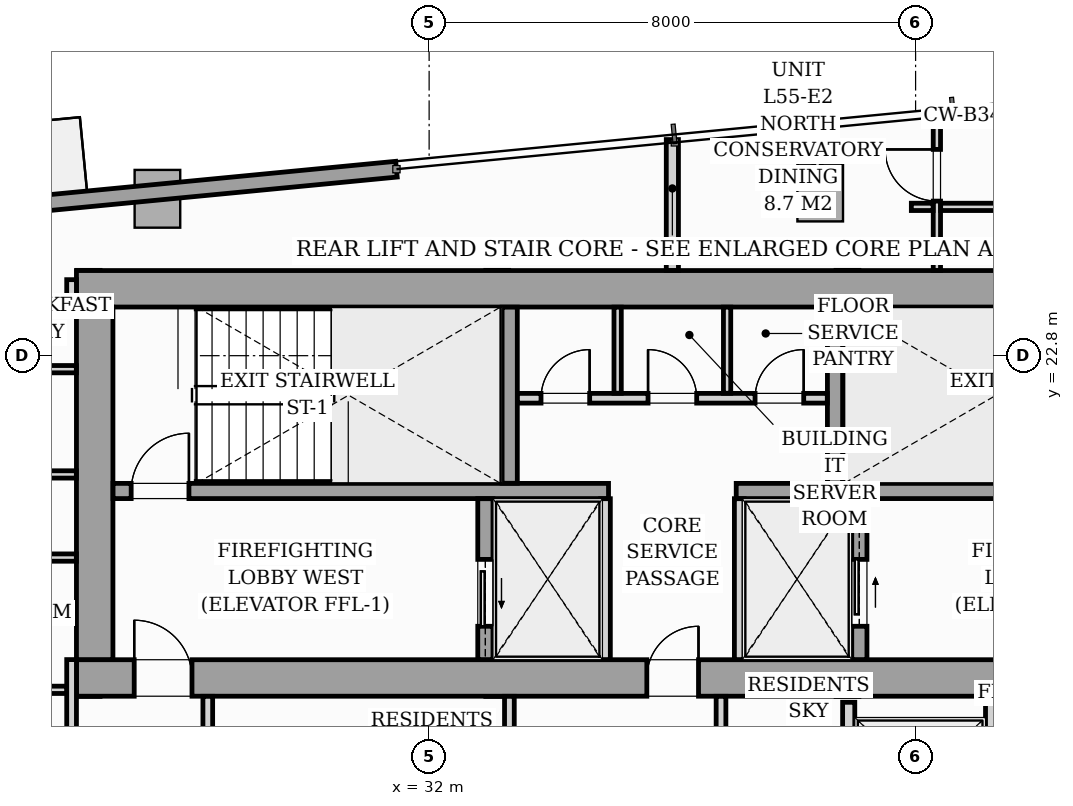
"""IFC4 building model, lengths in metres.
Left out: names, types, materials, properties, quantities, classifications, styles, units other than length and angle.
Written with IfcOpenShell. Run it as: python <this file> out.ifc"""

import sys

from ifc_helpers import new_model, si_unit, direction, frame, frame_2d, origin, origin_2d, place, context, subcontext, project, spatial, rectangle, i_section, extrude, source, transform, mapped, element, fill, save


model = new_model("IFC4")
c1 = context("Model", 3, precision=1e-05, world=origin(), true_north=direction((0.0, 1.0)))
c2 = subcontext(c1, "Body", "Model", "MODEL_VIEW")
j1 = project(units=[si_unit("LENGTHUNIT", "METRE"), si_unit("PLANEANGLEUNIT", "RADIAN")], contexts=[c1])
p1 = place(None, origin())
s1 = spatial("IfcSite", under=j1, at=p1, CompositionType="ELEMENT")
p2 = place(p1, origin())
s2 = spatial("IfcBuilding", under=s1, at=p2, CompositionType="ELEMENT")
p3 = place(p2, frame((0.0, 0.0, 192.2)))
s3 = spatial("IfcBuildingStorey", under=s2, at=p3, CompositionType="ELEMENT", Elevation=192.2)
m1 = source(origin(), c2, "Body", "SweptSolid", [
    extrude(i_section(OverallWidth=0.416, OverallDepth=0.446, WebThickness=0.039, FlangeThickness=0.063, FilletRadius=0.018, at=origin_2d()), origin(), (0.0, 0.0, 1.0), 3.196),
])
for number, where, z_axis, x_axis in (
    (1, (26.4, 17.4, 0.002), (0.0, 0.0, 1.0), (1.0, 0.0, 0.0)),
    (2, (33.12, 17.4, 0.002), (0.0, 0.0, 1.0), (1.0, 0.0, 0.0)),
    (3, (38.88, 17.4, 0.002), (0.0, 0.0, 1.0), (1.0, 0.0, 0.0)),
    (4, (26.4, 24.0, 0.002), (0.0, 0.0, 1.0), (1.0, 0.0, 0.0)),
    (5, (33.12, 24.0, 0.002), (0.0, 0.0, 1.0), (1.0, 0.0, 0.0)),
    (6, (38.88, 24.0, 0.002), (0.0, 0.0, 1.0), (1.0, 0.0, 0.0)),
):
    element("IfcColumn", number, at=place(p3, frame(where, z_axis=z_axis, x_axis=x_axis)), inside=s3, PredefinedType="PILASTER", context=c2, shape_type="MappedRepresentation", body=[
        mapped(m1, transform((0.0, 0.0, 0.0), scale=1.0)),
    ])
m2 = source(origin(), c2, "Body", "SweptSolid", [
    extrude(rectangle(XDim=0.75, YDim=0.95, at=origin_2d()), origin(), (0.0, 0.0, 1.0), 3.196),
])
for number, where, z_axis, x_axis in (
    (7, (27.532, 25.38, 0.002), (0.0, 0.0, 1.0), (0.995, 0.096, 0.0)),
    (8, (38.431, 25.483, 0.002), (0.0, 0.0, 1.0), (0.995, 0.096, 0.0)),
):
    element("IfcColumn", number, at=place(p3, frame(where, z_axis=z_axis, x_axis=x_axis)), inside=s3, PredefinedType="COLUMN", context=c2, shape_type="MappedRepresentation", body=[
        mapped(m2, transform((0.0, 0.0, 0.0), scale=1.0)),
    ])
p4 = place(p3, frame((15.437, 24.324, 0.0), z_axis=(0.0, 0.0, 1.0), x_axis=(0.995395627913, 0.095851676732, 0.0)))
e9 = element("IfcWall", 9, at=p4, inside=s3, PredefinedType="STANDARD", context=c2, shape_type="SweptSolid", body=[
    extrude(rectangle(XDim=16.1, YDim=0.26, at=frame_2d((8.05, 0.0))), origin(), (0.0, 0.0, 1.0), 2.94),
])
p5 = place(p4, frame((5.721, 0.0, 0.0)))
e10 = element("IfcOpeningElement", 10, at=p5, cuts=e9, PredefinedType="OPENING", context=c2, shape_type="SweptSolid", body=[
    extrude(rectangle(XDim=1.8, YDim=2.06, at=frame_2d((0.9, 1.03))), frame((0.0, 0.14, 0.0), z_axis=(0.0, -1.0, 0.0), x_axis=(1.0, 0.0, 0.0)), (0.0, 0.0, 1.0), 0.28),
])
p6 = place(p4, frame((2.05, 0.0, 0.65)))
e11 = element("IfcOpeningElement", 11, at=p6, cuts=e9, PredefinedType="OPENING", context=c2, shape_type="SweptSolid", body=[
    extrude(rectangle(XDim=1.6, YDim=1.5, at=frame_2d((0.8, 0.75))), frame((0.0, 0.14, 0.0), z_axis=(0.0, -1.0, 0.0), x_axis=(1.0, 0.0, 0.0)), (0.0, 0.0, 1.0), 0.28),
])
p7 = place(p3, frame((26.2, 17.5, 0.0), z_axis=(0.0, 0.0, 1.0), x_axis=(1.0, 0.0, 0.0)))
e12 = element("IfcWall", 12, at=p7, inside=s3, PredefinedType="SHEAR", context=c2, shape_type="SweptSolid", body=[
    extrude(rectangle(XDim=19.6, YDim=0.6, at=frame_2d((9.8, 0.0))), origin(), (0.0, 0.0, 1.0), 3.2),
])
p8 = place(p7, frame((0.95, 0.0, 0.0)))
e13 = element("IfcOpeningElement", 13, at=p8, cuts=e12, PredefinedType="OPENING", context=c2, shape_type="SweptSolid", body=[
    extrude(rectangle(XDim=0.95, YDim=2.06, at=frame_2d((0.475, 1.03))), frame((0.0, 0.31, 0.0), z_axis=(0.0, -1.0, 0.0), x_axis=(1.0, 0.0, 0.0)), (0.0, 0.0, 1.0), 0.62),
])
p9 = place(p7, frame((9.38, 0.0, 0.0)))
e14 = element("IfcOpeningElement", 14, at=p9, cuts=e12, PredefinedType="OPENING", context=c2, shape_type="SweptSolid", body=[
    extrude(rectangle(XDim=0.85, YDim=2.0, at=frame_2d((0.425, 1.0))), frame((0.0, 0.31, 0.0), z_axis=(0.0, -1.0, 0.0), x_axis=(1.0, 0.0, 0.0)), (0.0, 0.0, 1.0), 0.62),
])
p10 = place(p7, frame((17.55, 0.0, 0.0)))
e15 = element("IfcOpeningElement", 15, at=p10, cuts=e12, PredefinedType="OPENING", context=c2, shape_type="SweptSolid", body=[
    extrude(rectangle(XDim=0.95, YDim=2.06, at=frame_2d((0.475, 1.03))), frame((0.0, 0.31, 0.0), z_axis=(0.0, -1.0, 0.0), x_axis=(1.0, 0.0, 0.0)), (0.0, 0.0, 1.0), 0.62),
])
p11 = place(p3, frame((26.2, 23.9, 0.0), z_axis=(0.0, 0.0, 1.0), x_axis=(1.0, 0.0, 0.0)))
e16 = element("IfcWall", 16, at=p11, inside=s3, PredefinedType="SHEAR", context=c2, shape_type="SweptSolid", body=[
    extrude(rectangle(XDim=19.6, YDim=0.6, at=frame_2d((9.8, 0.0))), origin(), (0.0, 0.0, 1.0), 3.2),
])
p12 = place(p3, frame((26.5, 17.802, 0.0), z_axis=(0.0, 0.0, 1.0), x_axis=(0.0, 1.0, 0.0)))
e17 = element("IfcWall", 17, at=p12, inside=s3, PredefinedType="SHEAR", context=c2, shape_type="SweptSolid", body=[
    extrude(rectangle(XDim=5.796, YDim=0.6, at=frame_2d((2.898, 0.0))), origin(), (0.0, 0.0, 1.0), 3.2),
])
p13 = place(p3, frame((26.802, 20.575, 0.0), z_axis=(0.0, 0.0, 1.0), x_axis=(1.0, 0.0, 0.0)))
e18 = element("IfcWall", 18, at=p13, inside=s3, PredefinedType="SOLIDWALL", context=c2, shape_type="SweptSolid", body=[
    extrude(rectangle(XDim=8.148, YDim=0.25, at=frame_2d((4.074, 0.0))), origin(), (0.0, 0.0, 1.0), 3.2),
])
p14 = place(p13, frame((0.298, 0.0, 0.0)))
e19 = element("IfcOpeningElement", 19, at=p14, cuts=e18, PredefinedType="OPENING", context=c2, shape_type="SweptSolid", body=[
    extrude(rectangle(XDim=0.95, YDim=2.06, at=frame_2d((0.475, 1.03))), frame((0.0, 0.135, 0.0), z_axis=(0.0, -1.0, 0.0), x_axis=(1.0, 0.0, 0.0)), (0.0, 0.0, 1.0), 0.27),
])
p15 = place(p3, frame((37.05, 20.575, 0.0), z_axis=(0.0, 0.0, 1.0), x_axis=(1.0, 0.0, 0.0)))
e20 = element("IfcWall", 20, at=p15, inside=s3, PredefinedType="SOLIDWALL", context=c2, shape_type="SweptSolid", body=[
    extrude(rectangle(XDim=8.148, YDim=0.25, at=frame_2d((4.074, 0.0))), origin(), (0.0, 0.0, 1.0), 3.2),
])
p16 = place(p15, frame((6.6, 0.0, 0.0)))
e21 = element("IfcOpeningElement", 21, at=p16, cuts=e20, PredefinedType="OPENING", context=c2, shape_type="SweptSolid", body=[
    extrude(rectangle(XDim=0.95, YDim=2.06, at=frame_2d((0.475, 1.03))), frame((0.0, 0.135, 0.0), z_axis=(0.0, -1.0, 0.0), x_axis=(1.0, 0.0, 0.0)), (0.0, 0.0, 1.0), 0.27),
])
for number, where, z_axis, x_axis in (
    (22, (33.325, 20.702, 0.0), (0.0, 0.0, 1.0), (0.0, 1.0, 0.0)),
    (23, (38.675, 20.702, 0.0), (0.0, 0.0, 1.0), (0.0, 1.0, 0.0)),
):
    element("IfcWall", number, at=place(p3, frame(where, z_axis=z_axis, x_axis=x_axis)), inside=s3, PredefinedType="SOLIDWALL", context=c2, shape_type="SweptSolid", body=[
        extrude(rectangle(XDim=2.896, YDim=0.25, at=frame_2d((1.448, 0.0))), origin(), (0.0, 0.0, 1.0), 3.2),
    ])
p17 = place(p3, frame((32.925, 17.802, 0.0), z_axis=(0.0, 0.0, 1.0), x_axis=(0.0, 1.0, 0.0)))
e24 = element("IfcWall", 24, at=p17, inside=s3, PredefinedType="SOLIDWALL", context=c2, shape_type="SweptSolid", body=[
    extrude(rectangle(XDim=2.646, YDim=0.25, at=frame_2d((1.323, 0.0))), origin(), (0.0, 0.0, 1.0), 3.2),
])
p18 = place(p17, frame((0.548, 0.0, 0.0)))
e25 = element("IfcOpeningElement", 25, at=p18, cuts=e24, PredefinedType="OPENING", context=c2, shape_type="SweptSolid", body=[
    extrude(rectangle(XDim=1.1, YDim=2.08, at=frame_2d((0.55, 1.04))), frame((0.0, 0.135, 0.0), z_axis=(0.0, -1.0, 0.0), x_axis=(1.0, 0.0, 0.0)), (0.0, 0.0, 1.0), 0.27),
])
for number, where, z_axis, x_axis in (
    (26, (34.9, 17.802, 0.0), (0.0, 0.0, 1.0), (0.0, 1.0, 0.0)),
    (27, (37.1, 17.802, 0.0), (0.0, 0.0, 1.0), (0.0, 1.0, 0.0)),
):
    element("IfcWall", number, at=place(p3, frame(where, z_axis=z_axis, x_axis=x_axis)), inside=s3, PredefinedType="PARTITIONING", context=c2, shape_type="SweptSolid", body=[
        extrude(rectangle(XDim=2.646, YDim=0.16, at=frame_2d((1.323, 0.0))), origin(), (0.0, 0.0, 1.0), 2.94),
    ])
p19 = place(p3, frame((39.075, 17.802, 0.0), z_axis=(0.0, 0.0, 1.0), x_axis=(0.0, 1.0, 0.0)))
e28 = element("IfcWall", 28, at=p19, inside=s3, PredefinedType="SOLIDWALL", context=c2, shape_type="SweptSolid", body=[
    extrude(rectangle(XDim=2.646, YDim=0.25, at=frame_2d((1.323, 0.0))), origin(), (0.0, 0.0, 1.0), 3.2),
])
p20 = place(p19, frame((0.548, 0.0, 0.0)))
e29 = element("IfcOpeningElement", 29, at=p20, cuts=e28, PredefinedType="OPENING", context=c2, shape_type="SweptSolid", body=[
    extrude(rectangle(XDim=1.1, YDim=2.08, at=frame_2d((0.55, 1.04))), frame((0.0, 0.135, 0.0), z_axis=(0.0, -1.0, 0.0), x_axis=(1.0, 0.0, 0.0)), (0.0, 0.0, 1.0), 0.27),
])
p21 = place(p3, frame((33.452, 22.1, 0.0), z_axis=(0.0, 0.0, 1.0), x_axis=(1.0, 0.0, 0.0)))
e30 = element("IfcWall", 30, at=p21, inside=s3, PredefinedType="PARTITIONING", context=c2, shape_type="SweptSolid", body=[
    extrude(rectangle(XDim=5.096, YDim=0.16, at=frame_2d((2.548, 0.0))), origin(), (0.0, 0.0, 1.0), 2.94),
])
p22 = place(p21, frame((0.388, 0.0, 0.0)))
e31 = element("IfcOpeningElement", 31, at=p22, cuts=e30, PredefinedType="OPENING", context=c2, shape_type="SweptSolid", body=[
    extrude(rectangle(XDim=0.8, YDim=2.05, at=frame_2d((0.4, 1.025))), frame((0.0, 0.09, 0.0), z_axis=(0.0, -1.0, 0.0), x_axis=(1.0, 0.0, 0.0)), (0.0, 0.0, 1.0), 0.18),
])
p23 = place(p21, frame((2.148, 0.0, 0.0)))
e32 = element("IfcOpeningElement", 32, at=p23, cuts=e30, PredefinedType="OPENING", context=c2, shape_type="SweptSolid", body=[
    extrude(rectangle(XDim=0.8, YDim=2.05, at=frame_2d((0.4, 1.025))), frame((0.0, 0.09, 0.0), z_axis=(0.0, -1.0, 0.0), x_axis=(1.0, 0.0, 0.0)), (0.0, 0.0, 1.0), 0.18),
])
p24 = place(p21, frame((3.908, 0.0, 0.0)))
e33 = element("IfcOpeningElement", 33, at=p24, cuts=e30, PredefinedType="OPENING", context=c2, shape_type="SweptSolid", body=[
    extrude(rectangle(XDim=0.8, YDim=2.05, at=frame_2d((0.4, 1.025))), frame((0.0, 0.09, 0.0), z_axis=(0.0, -1.0, 0.0), x_axis=(1.0, 0.0, 0.0)), (0.0, 0.0, 1.0), 0.18),
])
for number, where, z_axis, x_axis in (
    (34, (35.1, 22.182, 0.0), (0.0, 0.0, 1.0), (0.0, 1.0, 0.0)),
    (35, (36.9, 22.182, 0.0), (0.0, 0.0, 1.0), (0.0, 1.0, 0.0)),
):
    element("IfcWall", number, at=place(p3, frame(where, z_axis=z_axis, x_axis=x_axis)), inside=s3, PredefinedType="PARTITIONING", context=c2, shape_type="SweptSolid", body=[
        extrude(rectangle(XDim=1.416, YDim=0.12, at=frame_2d((0.708, 0.0))), origin(), (0.0, 0.0, 1.0), 2.94),
    ])
for number, where, z_axis, x_axis in (
    (36, (38.9, 14.75, 0.0), (0.0, 0.0, 1.0), (0.0, 1.0, 0.0)),
    (37, (41.25, 14.75, 0.0), (0.0, 0.0, 1.0), (0.0, 1.0, 0.0)),
):
    element("IfcWall", number, at=place(p3, frame(where, z_axis=z_axis, x_axis=x_axis)), inside=s3, PredefinedType="PARTITIONING", context=c2, shape_type="SweptSolid", body=[
        extrude(rectangle(XDim=2.35, YDim=0.2, at=frame_2d((1.175, 0.0))), origin(), (0.0, 0.0, 1.0), 2.94),
    ])
p25 = place(p3, frame((26.12, 13.362, 0.0), z_axis=(0.0, 0.0, 1.0), x_axis=(0.0, 1.0, 0.0)))
e38 = element("IfcWall", 38, at=p25, inside=s3, PredefinedType="PARTITIONING", context=c2, shape_type="SweptSolid", body=[
    extrude(rectangle(XDim=4.44, YDim=0.16, at=frame_2d((2.22, 0.0))), origin(), (0.0, 0.0, 1.0), 2.94),
])
p26 = place(p25, frame((0.493, 0.0, 0.0)))
e39 = element("IfcOpeningElement", 39, at=p26, cuts=e38, PredefinedType="OPENING", context=c2, shape_type="SweptSolid", body=[
    extrude(rectangle(XDim=0.95, YDim=2.06, at=frame_2d((0.475, 1.03))), frame((0.0, 0.09, 0.0), z_axis=(0.0, -1.0, 0.0), x_axis=(1.0, 0.0, 0.0)), (0.0, 0.0, 1.0), 0.18),
])
p27 = place(p3, frame((26.12, 23.598, 0.0), z_axis=(0.0, 0.0, 1.0), x_axis=(0.0, 1.0, 0.0)))
e40 = element("IfcWall", 40, at=p27, inside=s3, PredefinedType="PARTITIONING", context=c2, shape_type="SweptSolid", body=[
    extrude(rectangle(XDim=0.452, YDim=0.16, at=frame_2d((0.226, 0.0))), origin(), (0.0, 0.0, 1.0), 2.94),
])
p28 = place(p3, frame((36.0, 24.202, 0.0), z_axis=(0.0, 0.0, 1.0), x_axis=(0.0, 1.0, 0.0)))
e41 = element("IfcWall", 41, at=p28, inside=s3, PredefinedType="PARTITIONING", context=c2, shape_type="SweptSolid", body=[
    extrude(rectangle(XDim=2.152, YDim=0.2, at=frame_2d((1.076, 0.0))), origin(), (0.0, 0.0, 1.0), 2.94),
])
p29 = place(p3, frame((23.782, 17.305, 0.0), z_axis=(0.0, 0.0, 1.0), x_axis=(1.0, 0.0, 0.0)))
e42 = element("IfcWall", 42, at=p29, inside=s3, PredefinedType="PARTITIONING", context=c2, shape_type="SweptSolid", body=[
    extrude(rectangle(XDim=2.256, YDim=0.12, at=frame_2d((1.128, 0.0))), origin(), (0.0, 0.0, 1.0), 2.281),
])
p30 = place(p3, frame((23.782, 19.48, 0.0), z_axis=(0.0, 0.0, 1.0), x_axis=(1.0, 0.0, 0.0)))
e43 = element("IfcWall", 43, at=p30, inside=s3, PredefinedType="PARTITIONING", context=c2, shape_type="SweptSolid", body=[
    extrude(rectangle(XDim=2.416, YDim=0.12, at=frame_2d((1.208, 0.0))), origin(), (0.0, 0.0, 1.0), 2.94),
])
p31 = place(p3, frame((14.612, 22.578, 0.0), z_axis=(0.0, 0.0, 1.0), x_axis=(1.0, 0.0, 0.0)))
e44 = element("IfcWall", 44, at=p31, inside=s3, PredefinedType="PARTITIONING", context=c2, shape_type="SweptSolid", body=[
    extrude(rectangle(XDim=11.586, YDim=0.12, at=frame_2d((5.793, 0.0))), origin(), (0.0, 0.0, 1.0), 2.94),
])
p32 = place(p31, frame((5.266, 0.0, 0.0)))
e45 = element("IfcOpeningElement", 45, at=p32, cuts=e44, PredefinedType="OPENING", context=c2, shape_type="SweptSolid", body=[
    extrude(rectangle(XDim=0.85, YDim=2.05, at=frame_2d((0.425, 1.025))), frame((0.0, 0.07, 0.0), z_axis=(0.0, -1.0, 0.0), x_axis=(1.0, 0.0, 0.0)), (0.0, 0.0, 1.0), 0.14),
])
p33 = place(p3, frame((13.34, 20.847, 0.0), z_axis=(0.0, 0.0, 1.0), x_axis=(1.0, 0.0, 0.0)))
e46 = element("IfcWall", 46, at=p33, inside=s3, PredefinedType="PARTITIONING", context=c2, shape_type="SweptSolid", body=[
    extrude(rectangle(XDim=12.858, YDim=0.12, at=frame_2d((6.429, 0.0))), origin(), (0.0, 0.0, 1.0), 2.94),
])
p34 = place(p33, frame((5.875, 0.0, 0.0)))
e47 = element("IfcOpeningElement", 47, at=p34, cuts=e46, PredefinedType="OPENING", context=c2, shape_type="SweptSolid", body=[
    extrude(rectangle(XDim=0.85, YDim=2.05, at=frame_2d((0.425, 1.025))), frame((0.0, 0.07, 0.0), z_axis=(0.0, -1.0, 0.0), x_axis=(1.0, 0.0, 0.0)), (0.0, 0.0, 1.0), 0.14),
])
p35 = place(p3, frame((40.35, 24.202, 0.0), z_axis=(0.0, 0.0, 1.0), x_axis=(0.0, 1.0, 0.0)))
e48 = element("IfcWall", 48, at=p35, inside=s3, PredefinedType="PARTITIONING", context=c2, shape_type="SweptSolid", body=[
    extrude(rectangle(XDim=2.571, YDim=0.12, at=frame_2d((1.286, 0.0))), origin(), (0.0, 0.0, 1.0), 2.94),
])
p36 = place(p35, frame((1.14, 0.0, 0.0)))
e49 = element("IfcOpeningElement", 49, at=p36, cuts=e48, PredefinedType="OPENING", context=c2, shape_type="SweptSolid", body=[
    extrude(rectangle(XDim=0.85, YDim=2.05, at=frame_2d((0.425, 1.025))), frame((0.0, 0.07, 0.0), z_axis=(0.0, -1.0, 0.0), x_axis=(1.0, 0.0, 0.0)), (0.0, 0.0, 1.0), 0.14),
])
p37 = place(p3, frame((39.93, 25.247, 0.0), z_axis=(0.0, 0.0, 1.0), x_axis=(1.0, 0.0, 0.0)))
e50 = element("IfcWall", 50, at=p37, inside=s3, PredefinedType="PARTITIONING", context=c2, shape_type="SweptSolid", body=[
    extrude(rectangle(XDim=0.358, YDim=0.12, at=frame_2d((0.179, 0.0))), origin(), (0.0, 0.0, 1.0), 2.94),
])
p38 = place(p3, frame((40.412, 25.247, 0.0), z_axis=(0.0, 0.0, 1.0), x_axis=(1.0, 0.0, 0.0)))
e51 = element("IfcWall", 51, at=p38, inside=s3, PredefinedType="PARTITIONING", context=c2, shape_type="SweptSolid", body=[
    extrude(rectangle(XDim=11.744, YDim=0.12, at=frame_2d((5.872, 0.0))), origin(), (0.0, 0.0, 1.0), 2.94),
])
p39 = place(p38, frame((6.1, 0.0, 0.0)))
e52 = element("IfcOpeningElement", 52, at=p39, cuts=e51, PredefinedType="OPENING", context=c2, shape_type="SweptSolid", body=[
    extrude(rectangle(XDim=0.85, YDim=2.05, at=frame_2d((0.425, 1.025))), frame((0.0, 0.07, 0.0), z_axis=(0.0, -1.0, 0.0), x_axis=(1.0, 0.0, 0.0)), (0.0, 0.0, 1.0), 0.14),
])
for number, where, z_axis, x_axis in (
    (53, (28.36, 14.7, 0.0), (0.0, 0.0, 1.0), (0.0, 1.0, 0.0)),
    (54, (33.32, 14.7, 0.0), (0.0, 0.0, 1.0), (0.0, 1.0, 0.0)),
    (55, (36.8, 14.7, 0.0), (0.0, 0.0, 1.0), (0.0, 1.0, 0.0)),
):
    element("IfcWall", number, at=place(p3, frame(where, z_axis=z_axis, x_axis=x_axis)), inside=s3, PredefinedType="PARTITIONING", context=c2, shape_type="SweptSolid", body=[
        extrude(rectangle(XDim=2.498, YDim=0.16, at=frame_2d((1.249, 0.0))), origin(), (0.0, 0.0, 1.0), 2.94),
    ])
p40 = place(p3, frame((38.395, 25.861, 0.0), z_axis=(0.0, 0.0, 1.0), x_axis=(-0.095977354523, 0.995383517755, 0.0)))
e56 = element("IfcWall", 56, at=p40, inside=s3, PredefinedType="PARTITIONING", context=c2, shape_type="SweptSolid", body=[
    extrude(rectangle(XDim=0.72, YDim=0.12, at=frame_2d((0.36, 0.0))), origin(), (0.0, 0.0, 1.0), 2.94),
])
m3 = source(origin(), c2, "Body", "SweptSolid", [
    extrude(rectangle(XDim=0.95, YDim=2.06, at=frame_2d((0.475, 1.03))), frame((0.0, 0.025, 0.0), z_axis=(0.0, -1.0, 0.0), x_axis=(1.0, 0.0, 0.0)), (0.0, 0.0, 1.0), 0.05),
])
p41 = place(p8, origin())
e57 = element("IfcDoor", 57, at=p41, inside=s3, OperationType="SINGLE_SWING_LEFT", PredefinedType="DOOR", context=c2, shape_type="MappedRepresentation", body=[
    mapped(m3, transform((0.0, 0.0, 0.0), scale=1.0)),
])
fill(e13, e57)
m4 = source(origin(), c2, "Body", "SweptSolid", [
    extrude(rectangle(XDim=0.85, YDim=2.0, at=frame_2d((0.425, 1.0))), frame((0.0, 0.025, 0.0), z_axis=(0.0, -1.0, 0.0), x_axis=(1.0, 0.0, 0.0)), (0.0, 0.0, 1.0), 0.05),
])
p42 = place(p9, origin())
e58 = element("IfcDoor", 58, at=p42, inside=s3, OperationType="SINGLE_SWING_RIGHT", PredefinedType="DOOR", context=c2, shape_type="MappedRepresentation", body=[
    mapped(m4, transform((0.0, 0.0, 0.0), scale=1.0)),
])
fill(e14, e58)
p43 = place(p14, origin())
e59 = element("IfcDoor", 59, at=p43, inside=s3, OperationType="SINGLE_SWING_RIGHT", PredefinedType="DOOR", context=c2, shape_type="MappedRepresentation", body=[
    mapped(m3, transform((0.0, 0.0, 0.0), scale=1.0)),
])
fill(e19, e59)
m5 = source(origin(), c2, "Body", "SweptSolid", [
    extrude(rectangle(XDim=1.1, YDim=2.08, at=frame_2d((0.55, 1.04))), frame((0.0, 0.025, 0.0), z_axis=(0.0, -1.0, 0.0), x_axis=(1.0, 0.0, 0.0)), (0.0, 0.0, 1.0), 0.05),
])
p44 = place(p18, origin())
e60 = element("IfcDoor", 60, at=p44, inside=s3, OperationType="SLIDING_TO_LEFT", PredefinedType="DOOR", context=c2, shape_type="MappedRepresentation", body=[
    mapped(m5, transform((0.0, 0.0, 0.0), scale=1.0)),
])
fill(e25, e60)
p45 = place(p20, origin())
e61 = element("IfcDoor", 61, at=p45, inside=s3, OperationType="SLIDING_TO_RIGHT", PredefinedType="DOOR", context=c2, shape_type="MappedRepresentation", body=[
    mapped(m5, transform((0.0, 0.0, 0.0), scale=1.0)),
])
fill(e29, e61)
m6 = source(origin(), c2, "Body", "SweptSolid", [
    extrude(rectangle(XDim=0.8, YDim=2.05, at=frame_2d((0.4, 1.025))), frame((0.0, 0.025, 0.0), z_axis=(0.0, -1.0, 0.0), x_axis=(1.0, 0.0, 0.0)), (0.0, 0.0, 1.0), 0.05),
])
p46 = place(p22, origin())
e62 = element("IfcDoor", 62, at=p46, inside=s3, OperationType="SINGLE_SWING_RIGHT", PredefinedType="DOOR", context=c2, shape_type="MappedRepresentation", body=[
    mapped(m6, transform((0.0, 0.0, 0.0), scale=1.0)),
])
fill(e31, e62)
p47 = place(p23, origin())
e63 = element("IfcDoor", 63, at=p47, inside=s3, OperationType="SINGLE_SWING_LEFT", PredefinedType="DOOR", context=c2, shape_type="MappedRepresentation", body=[
    mapped(m6, transform((0.0, 0.0, 0.0), scale=1.0)),
])
fill(e32, e63)
p48 = place(p24, origin())
e64 = element("IfcDoor", 64, at=p48, inside=s3, OperationType="SINGLE_SWING_RIGHT", PredefinedType="DOOR", context=c2, shape_type="MappedRepresentation", body=[
    mapped(m6, transform((0.0, 0.0, 0.0), scale=1.0)),
])
fill(e33, e64)
m7 = source(origin(), c2, "Body", "SweptSolid", [
    extrude(rectangle(XDim=0.85, YDim=2.05, at=frame_2d((0.425, 1.025))), frame((0.0, 0.025, 0.0), z_axis=(0.0, -1.0, 0.0), x_axis=(1.0, 0.0, 0.0)), (0.0, 0.0, 1.0), 0.05),
])
p49 = place(p36, origin())
e65 = element("IfcDoor", 65, at=p49, inside=s3, OperationType="SINGLE_SWING_RIGHT", PredefinedType="DOOR", context=c2, shape_type="MappedRepresentation", body=[
    mapped(m7, transform((0.0, 0.0, 0.0), scale=1.0)),
])
fill(e49, e65)
save(model, sys.argv[1])
